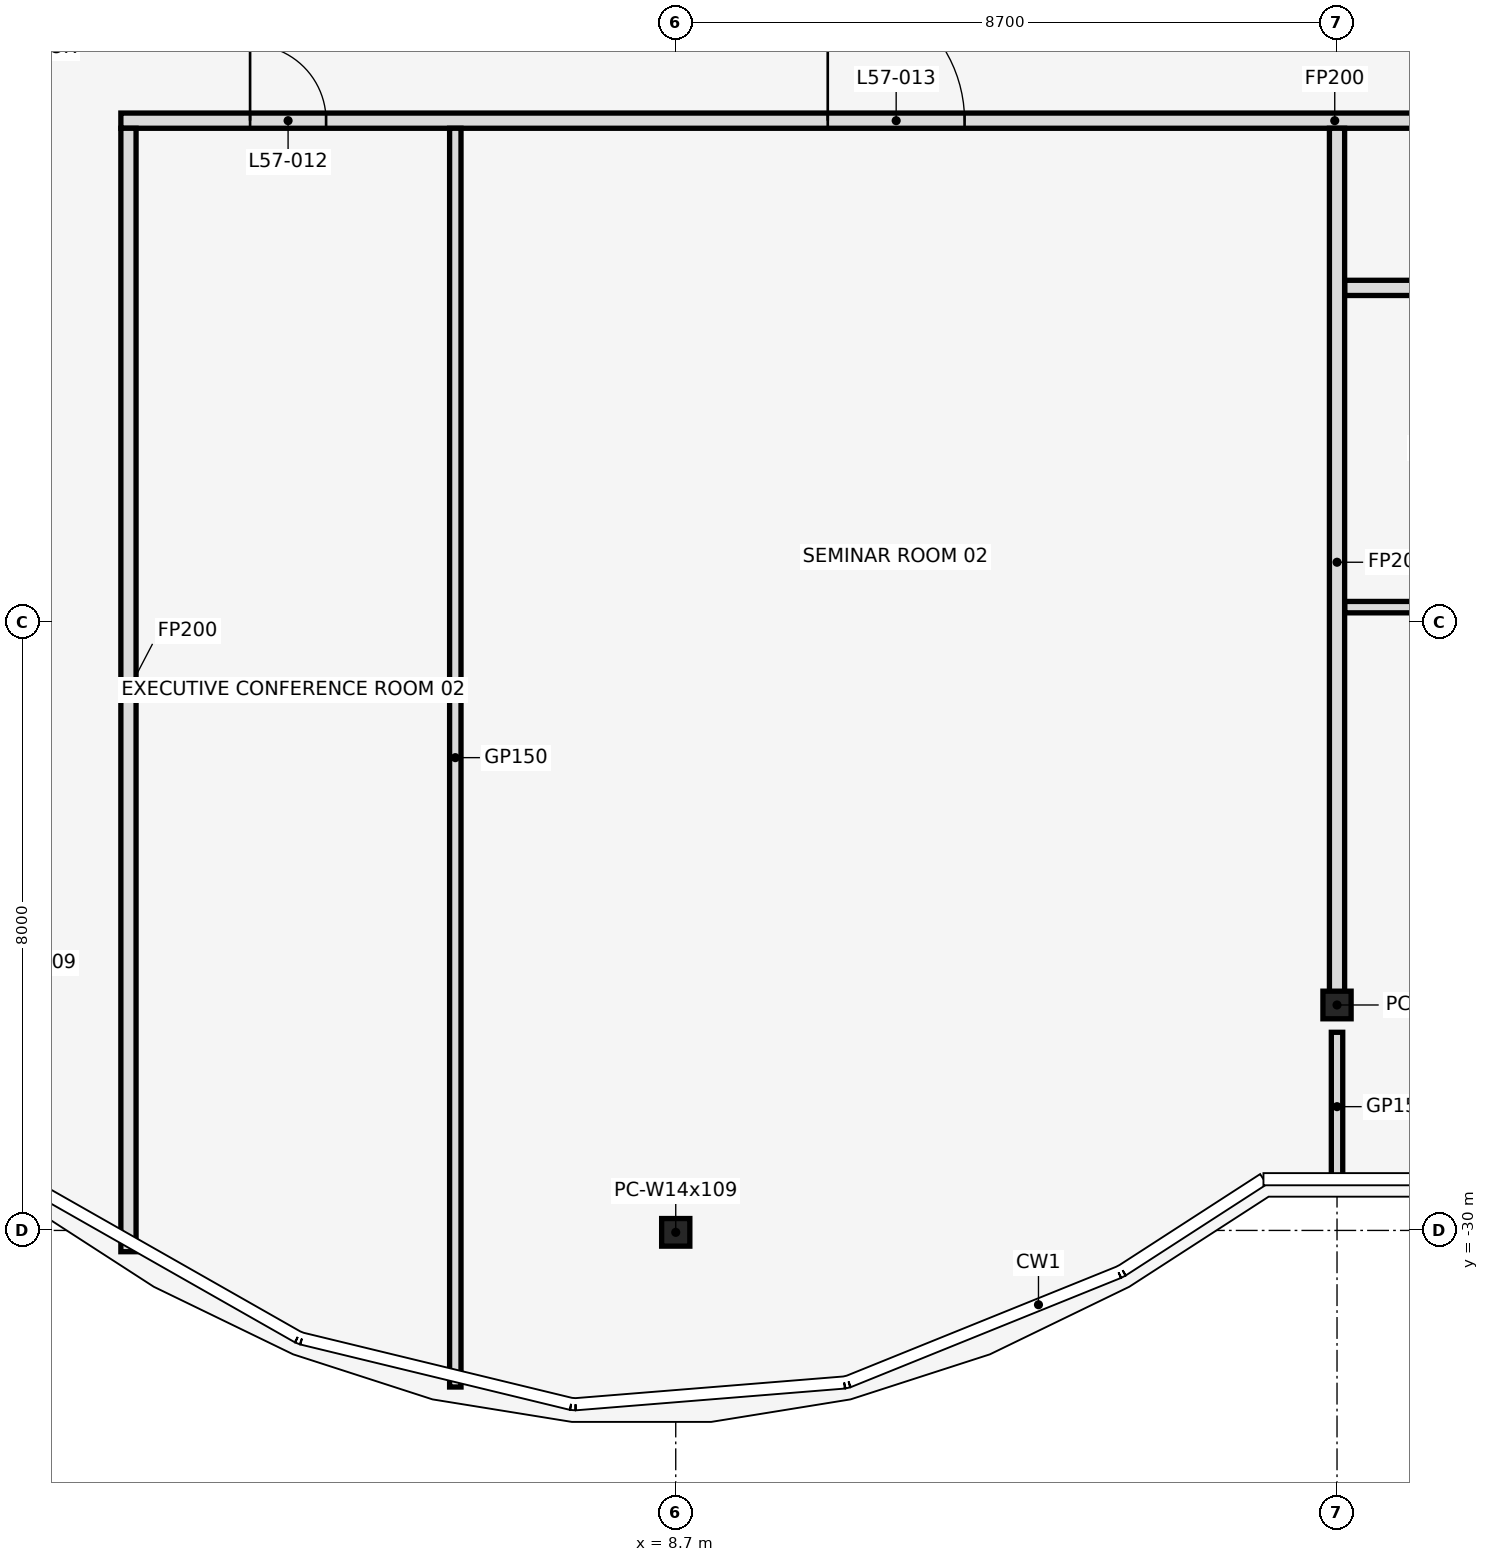
"""IFC4 building model, lengths in metres.
Left out: names, types, materials, properties, quantities, classifications, styles, units other than length and angle.
Written with IfcOpenShell. Run it as: python <this file> out.ifc"""

import sys

from ifc_helpers import new_model, si_unit, direction, frame, frame_2d, origin, origin_2d, place, context, subcontext, project, spatial, rectangle, i_section, extrude, element, fill, save


model = new_model("IFC4")
c1 = context("Model", 3, precision=1e-05, world=origin(), true_north=direction((0.0, 1.0)))
c2 = subcontext(c1, "Body", "Model", "MODEL_VIEW")
j1 = project(units=[si_unit("LENGTHUNIT", "METRE"), si_unit("PLANEANGLEUNIT", "RADIAN")], contexts=[c1])
p1 = place(None, origin())
s1 = spatial("IfcSite", under=j1, at=p1, CompositionType="ELEMENT")
p2 = place(p1, origin())
s2 = spatial("IfcBuilding", under=s1, at=p2, CompositionType="ELEMENT")
p3 = place(p2, frame((0.0, 0.0, 254.0)))
s3 = spatial("IfcBuildingStorey", under=s2, at=p3, CompositionType="ELEMENT", Elevation=254.0)
for number, where, z_axis, x_axis in (
    (1, (8.7, -30.025, 0.0), (0.0, 0.0, 1.0), (1.0, 0.0, 0.0)),
    (2, (17.4, -27.034, 0.0), (0.0, 0.0, 1.0), (1.0, 0.0, 0.0)),
):
    element("IfcColumn", number, at=place(p3, frame(where, z_axis=z_axis, x_axis=x_axis)), inside=s3, PredefinedType="COLUMN", context=c2, shape_type="SweptSolid", body=[
        extrude(i_section(OverallWidth=0.371, OverallDepth=0.363, WebThickness=0.013, FlangeThickness=0.022, at=origin_2d()), origin(), (0.0, 0.0, 1.0), 4.2),
    ])
p4 = place(p3, frame((17.5, -21.8, 0.0), z_axis=(0.0, 0.0, 1.0), x_axis=(1.0, 0.0, 0.0)))
e3 = element("IfcWall", 3, at=p4, inside=s3, PredefinedType="PARTITIONING", context=c2, shape_type="SweptSolid", body=[
    extrude(rectangle(XDim=8.7, YDim=0.15, at=frame_2d((4.35, 0.0))), origin(), (0.0, 0.0, 1.0), 3.118),
])
p5 = place(p3, frame((17.5, -17.6, 0.0), z_axis=(0.0, 0.0, 1.0), x_axis=(1.0, 0.0, 0.0)))
e4 = element("IfcWall", 4, at=p5, inside=s3, PredefinedType="PARTITIONING", context=c2, shape_type="SweptSolid", body=[
    extrude(rectangle(XDim=8.5, YDim=0.2, at=frame_2d((4.25, 0.0))), origin(), (0.0, 0.0, 1.0), 3.118),
])
p6 = place(p5, frame((1.1, 0.0, 0.0)))
e5 = element("IfcOpeningElement", 5, at=p6, cuts=e4, PredefinedType="OPENING", context=c2, shape_type="SweptSolid", body=[
    extrude(rectangle(XDim=0.9, YDim=2.1, at=frame_2d((0.45, 1.05))), frame((0.0, 0.112, 0.0), z_axis=(0.0, -1.0, 0.0), x_axis=(1.0, 0.0, 0.0)), (0.0, 0.0, 1.0), 0.224),
])
p7 = place(p5, frame((4.3, 0.0, 0.0)))
e6 = element("IfcOpeningElement", 6, at=p7, cuts=e4, PredefinedType="OPENING", context=c2, shape_type="SweptSolid", body=[
    extrude(rectangle(XDim=0.9, YDim=2.1, at=frame_2d((0.45, 1.05))), frame((0.0, 0.112, 0.0), z_axis=(0.0, -1.0, 0.0), x_axis=(1.0, 0.0, 0.0)), (0.0, 0.0, 1.0), 0.224),
])
p8 = place(p5, frame((6.9, 0.0, 0.0)))
e7 = element("IfcOpeningElement", 7, at=p8, cuts=e4, PredefinedType="OPENING", context=c2, shape_type="SweptSolid", body=[
    extrude(rectangle(XDim=1.0, YDim=2.1, at=frame_2d((0.5, 1.05))), frame((0.0, 0.112, 0.0), z_axis=(0.0, -1.0, 0.0), x_axis=(1.0, 0.0, 0.0)), (0.0, 0.0, 1.0), 0.224),
])
p9 = place(p3, frame((1.4, -15.4, 0.0), z_axis=(0.0, 0.0, 1.0), x_axis=(1.0, 0.0, 0.0)))
e8 = element("IfcWall", 8, at=p9, inside=s3, PredefinedType="PARTITIONING", context=c2, shape_type="SweptSolid", body=[
    extrude(rectangle(XDim=31.94, YDim=0.2, at=frame_2d((15.97, 0.0))), origin(), (0.0, 0.0, 1.0), 3.118),
])
p10 = place(p9, frame((1.7, 0.0, 0.0)))
e9 = element("IfcOpeningElement", 9, at=p10, cuts=e8, PredefinedType="OPENING", context=c2, shape_type="SweptSolid", body=[
    extrude(rectangle(XDim=1.0, YDim=2.1, at=frame_2d((0.5, 1.05))), frame((0.0, 0.112, 0.0), z_axis=(0.0, -1.0, 0.0), x_axis=(1.0, 0.0, 0.0)), (0.0, 0.0, 1.0), 0.224),
])
p11 = place(p9, frame((9.3, 0.0, 0.0)))
e10 = element("IfcOpeningElement", 10, at=p11, cuts=e8, PredefinedType="OPENING", context=c2, shape_type="SweptSolid", body=[
    extrude(rectangle(XDim=1.8, YDim=2.1, at=frame_2d((0.9, 1.05))), frame((0.0, 0.112, 0.0), z_axis=(0.0, -1.0, 0.0), x_axis=(1.0, 0.0, 0.0)), (0.0, 0.0, 1.0), 0.224),
])
p12 = place(p9, frame((19.9, 0.0, 0.0)))
e11 = element("IfcOpeningElement", 11, at=p12, cuts=e8, PredefinedType="OPENING", context=c2, shape_type="SweptSolid", body=[
    extrude(rectangle(XDim=0.9, YDim=2.1, at=frame_2d((0.45, 1.05))), frame((0.0, 0.112, 0.0), z_axis=(0.0, -1.0, 0.0), x_axis=(1.0, 0.0, 0.0)), (0.0, 0.0, 1.0), 0.224),
])
p13 = place(p9, frame((27.4, 0.0, 0.0)))
e12 = element("IfcOpeningElement", 12, at=p13, cuts=e8, PredefinedType="OPENING", context=c2, shape_type="SweptSolid", body=[
    extrude(rectangle(XDim=1.8, YDim=2.1, at=frame_2d((0.9, 1.05))), frame((0.0, 0.112, 0.0), z_axis=(0.0, -1.0, 0.0), x_axis=(1.0, 0.0, 0.0)), (0.0, 0.0, 1.0), 0.224),
])
p14 = place(p3, frame((1.5, -30.28, 0.0), z_axis=(0.0, 0.0, 1.0), x_axis=(0.0, 1.0, 0.0)))
e13 = element("IfcWall", 13, at=p14, inside=s3, PredefinedType="PARTITIONING", context=c2, shape_type="SweptSolid", body=[
    extrude(rectangle(XDim=14.78, YDim=0.2, at=frame_2d((7.39, 0.0))), origin(), (0.0, 0.0, 1.0), 3.118),
])
p15 = place(p3, frame((5.8, -32.06, 0.0), z_axis=(0.0, 0.0, 1.0), x_axis=(0.0, 1.0, 0.0)))
e14 = element("IfcWall", 14, at=p15, inside=s3, PredefinedType="PARTITIONING", context=c2, shape_type="SweptSolid", body=[
    extrude(rectangle(XDim=16.56, YDim=0.15, at=frame_2d((8.28, 0.0))), origin(), (0.0, 0.0, 1.0), 3.118),
])
p16 = place(p3, frame((17.4, -29.35, 0.0), z_axis=(0.0, 0.0, 1.0), x_axis=(0.0, 1.0, 0.0)))
e15 = element("IfcWall", 15, at=p16, inside=s3, PredefinedType="PARTITIONING", context=c2, shape_type="SweptSolid", body=[
    extrude(rectangle(XDim=1.957, YDim=0.15, at=frame_2d((0.979, 0.0))), origin(), (0.0, 0.0, 1.0), 3.118),
])
p17 = place(p3, frame((17.4, -26.919, 0.0), z_axis=(0.0, 0.0, 1.0), x_axis=(0.0, 1.0, 0.0)))
e16 = element("IfcWall", 16, at=p17, inside=s3, PredefinedType="PARTITIONING", context=c2, shape_type="SweptSolid", body=[
    extrude(rectangle(XDim=11.419, YDim=0.2, at=frame_2d((5.709, 0.0))), origin(), (0.0, 0.0, 1.0), 3.118),
])
p18 = place(p10, frame((1.0, 0.0, 0.0), z_axis=(0.0, 0.0, 1.0), x_axis=(-1.0, 0.0, 0.0)))
e17 = element("IfcDoor", 17, at=p18, inside=s3, OperationType="SINGLE_SWING_RIGHT", PredefinedType="DOOR", context=c2, shape_type="SweptSolid", body=[
    extrude(rectangle(XDim=1.0, YDim=2.1, at=frame_2d((0.5, 1.05))), frame((0.0, 0.025, 0.0), z_axis=(0.0, -1.0, 0.0), x_axis=(1.0, 0.0, 0.0)), (0.0, 0.0, 1.0), 0.05),
])
fill(e9, e17)
p19 = place(p11, origin())
e18 = element("IfcDoor", 18, at=p19, inside=s3, OperationType="SINGLE_SWING_LEFT", PredefinedType="DOOR", context=c2, shape_type="SweptSolid", body=[
    extrude(rectangle(XDim=1.8, YDim=2.1, at=frame_2d((0.9, 1.05))), frame((0.0, 0.025, 0.0), z_axis=(0.0, -1.0, 0.0), x_axis=(1.0, 0.0, 0.0)), (0.0, 0.0, 1.0), 0.05),
])
fill(e10, e18)
save(model, sys.argv[1])
